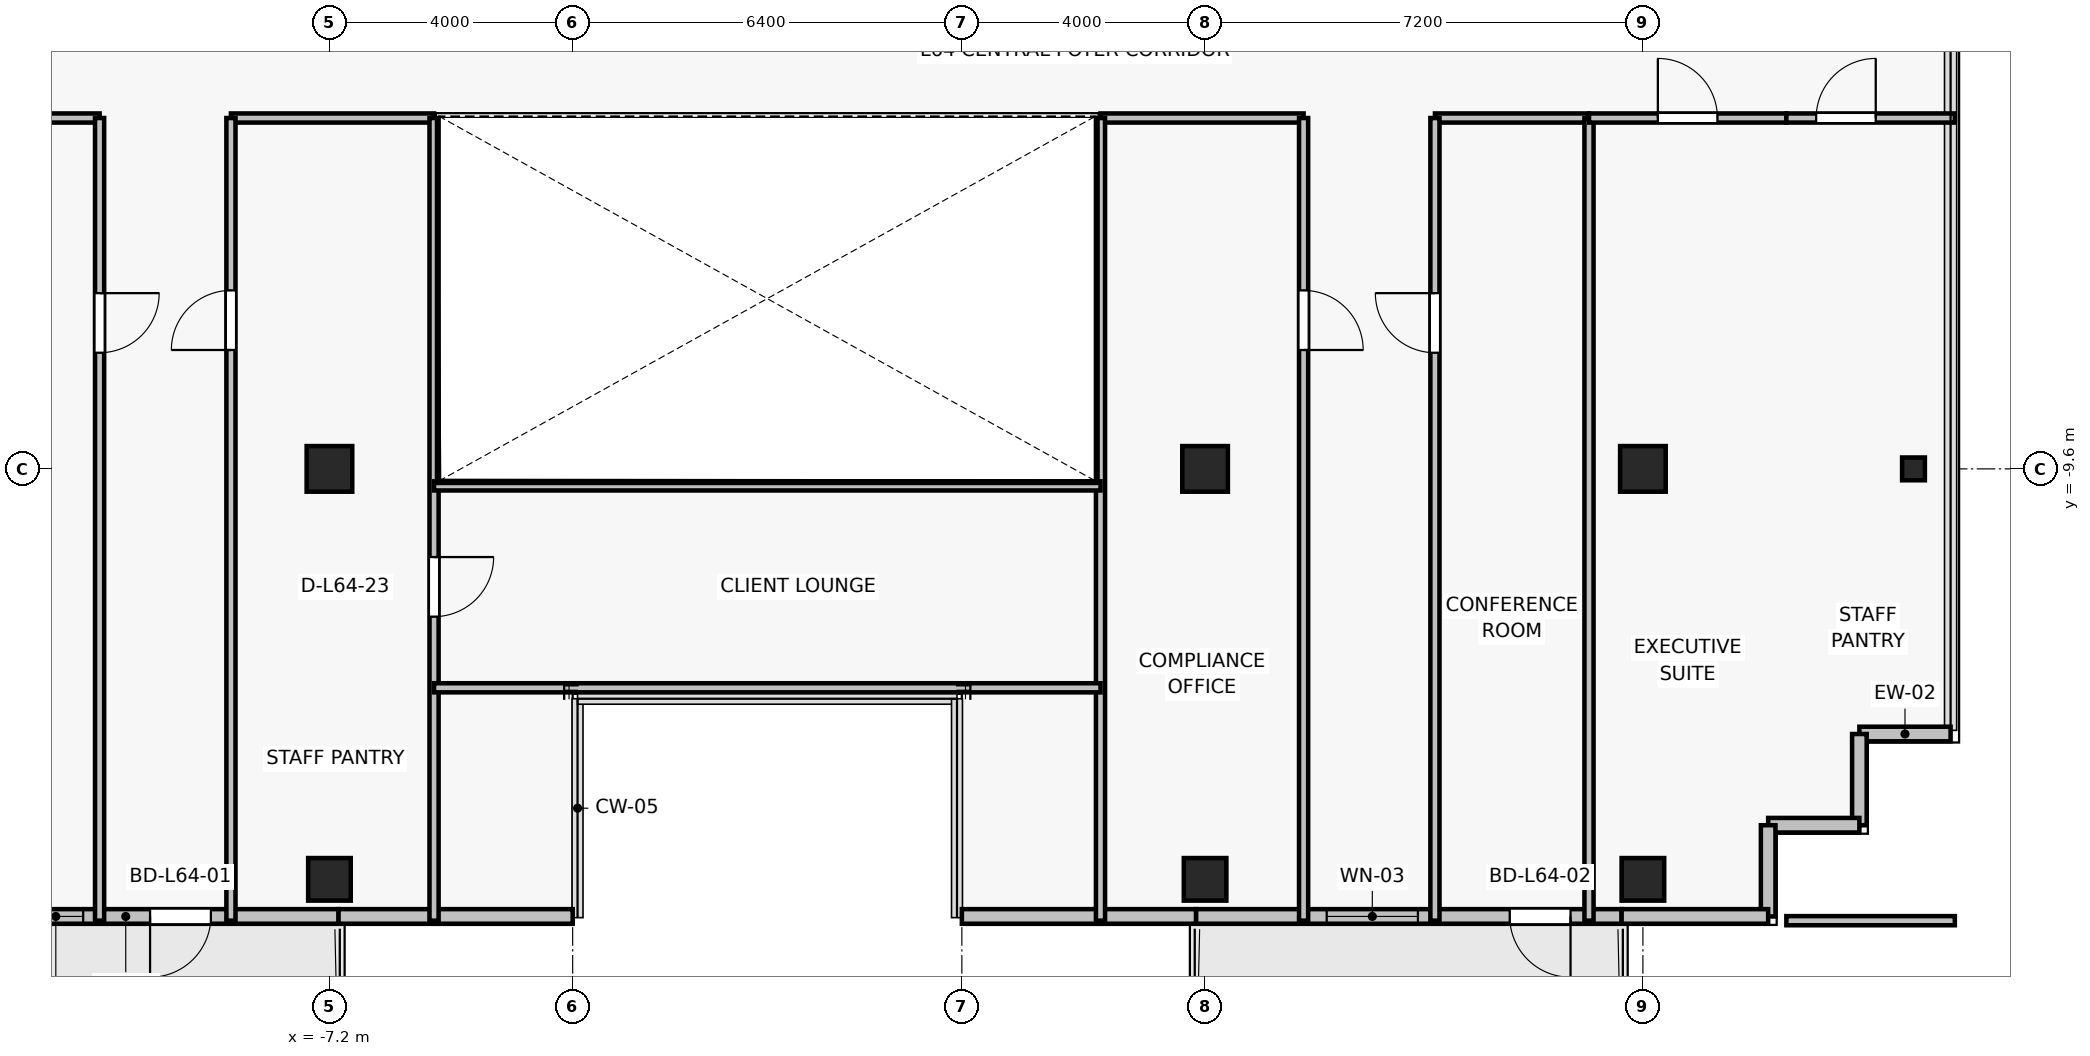
"""IFC4 building model, lengths in metres.
Left out: names, types, materials, properties, quantities, classifications, styles, units other than length and angle.
Written with IfcOpenShell. Run it as: python <this file> out.ifc"""

import sys

from ifc_helpers import new_model, si_unit, direction, frame, frame_2d, origin, origin_2d, place, context, subcontext, project, spatial, rectangle, i_section, extrude, source, transform, mapped, element, fill, save


model = new_model("IFC4")
c1 = context("Model", 3, precision=1e-05, world=origin(), true_north=direction((0.0, 1.0)))
c2 = subcontext(c1, "Body", "Model", "MODEL_VIEW")
j1 = project(units=[si_unit("LENGTHUNIT", "METRE"), si_unit("PLANEANGLEUNIT", "RADIAN")], contexts=[c1])
p1 = place(None, origin())
s1 = spatial("IfcSite", under=j1, at=p1, CompositionType="ELEMENT")
p2 = place(p1, origin())
s2 = spatial("IfcBuilding", under=s1, at=p2, CompositionType="ELEMENT")
p3 = place(p2, frame((0.0, 0.0, 228.7)))
s3 = spatial("IfcBuildingStorey", under=s2, at=p3, CompositionType="ELEMENT", Elevation=228.7)
for number, where, z_axis, x_axis in (
    (1, (-7.2, -9.6, 0.0), (0.0, 0.0, 1.0), (1.0, 0.0, 0.0)),
    (2, (7.2, -9.6, 0.0), (0.0, 0.0, 1.0), (1.0, 0.0, 0.0)),
    (3, (14.4, -9.6, 0.0), (0.0, 0.0, 1.0), (1.0, 0.0, 0.0)),
):
    element("IfcColumn", number, at=place(p3, frame(where, z_axis=z_axis, x_axis=x_axis)), inside=s3, PredefinedType="COLUMN", context=c2, shape_type="SweptSolid", body=[
        extrude(rectangle(XDim=0.75, YDim=0.75, at=origin_2d()), origin(), (0.0, 0.0, 1.0), 3.3),
    ])
for number, where, z_axis, x_axis in (
    (4, (-7.2, -16.35, 0.0), (0.0, 0.0, 1.0), (1.0, 0.0, 0.0)),
    (5, (7.2, -16.35, 0.0), (0.0, 0.0, 1.0), (1.0, 0.0, 0.0)),
    (6, (14.4, -16.35, 0.0), (0.0, 0.0, 1.0), (1.0, 0.0, 0.0)),
):
    element("IfcColumn", number, at=place(p3, frame(where, z_axis=z_axis, x_axis=x_axis)), inside=s3, PredefinedType="COLUMN", context=c2, shape_type="SweptSolid", body=[
        extrude(rectangle(XDim=0.7, YDim=0.7, at=origin_2d()), origin(), (0.0, 0.0, 1.0), 3.3),
    ])
p4 = place(p3, frame((18.85, -9.6, 0.0), z_axis=(0.0, 0.0, 1.0), x_axis=(1.0, 0.0, 0.0)))
e7 = element("IfcColumn", 7, at=p4, inside=s3, PredefinedType="COLUMN", context=c2, shape_type="SweptSolid", body=[
    extrude(i_section(OverallWidth=0.375, OverallDepth=0.375, WebThickness=0.017, FlangeThickness=0.027, FilletRadius=0.015, at=origin_2d()), origin(), (0.0, 0.0, 1.0), 3.3),
])
p5 = place(p3, frame((-7.05, -16.96, 0.0), z_axis=(0.0, 0.0, 1.0), x_axis=(-1.0, 0.0, 0.0)))
e8 = element("IfcWall", 8, at=p5, inside=s3, PredefinedType="SOLIDWALL", context=c2, shape_type="SweptSolid", body=[
    extrude(rectangle(XDim=7.0, YDim=0.24, at=frame_2d((3.5, 0.0))), origin(), (0.0, 0.0, 1.0), 2.665),
])
p6 = place(p5, frame((2.1, 0.0, 0.0)))
e9 = element("IfcOpeningElement", 9, at=p6, cuts=e8, PredefinedType="OPENING", context=c2, shape_type="SweptSolid", body=[
    extrude(rectangle(XDim=1.0, YDim=2.2, at=frame_2d((0.5, 1.1))), frame((0.0, 0.13, 0.0), z_axis=(0.0, -1.0, 0.0), x_axis=(1.0, 0.0, 0.0)), (0.0, 0.0, 1.0), 0.26),
])
p7 = place(p5, frame((4.2, 0.0, 0.85)))
e10 = element("IfcOpeningElement", 10, at=p7, cuts=e8, PredefinedType="OPENING", context=c2, shape_type="SweptSolid", body=[
    extrude(rectangle(XDim=0.9, YDim=1.35, at=frame_2d((0.45, 0.675))), frame((0.0, 0.13, 0.0), z_axis=(0.0, -1.0, 0.0), x_axis=(1.0, 0.0, 0.0)), (0.0, 0.0, 1.0), 0.26),
])
p8 = place(p3, frame((14.05, -16.96, 0.0), z_axis=(0.0, 0.0, 1.0), x_axis=(-1.0, 0.0, 0.0)))
e11 = element("IfcWall", 11, at=p8, inside=s3, PredefinedType="SOLIDWALL", context=c2, shape_type="SweptSolid", body=[
    extrude(rectangle(XDim=7.0, YDim=0.24, at=frame_2d((3.5, 0.0))), origin(), (0.0, 0.0, 1.0), 2.665),
])
p9 = place(p8, frame((0.84, 0.0, 0.0)))
e12 = element("IfcOpeningElement", 12, at=p9, cuts=e11, PredefinedType="OPENING", context=c2, shape_type="SweptSolid", body=[
    extrude(rectangle(XDim=1.0, YDim=2.2, at=frame_2d((0.5, 1.1))), frame((0.0, 0.13, 0.0), z_axis=(0.0, -1.0, 0.0), x_axis=(1.0, 0.0, 0.0)), (0.0, 0.0, 1.0), 0.26),
])
p10 = place(p8, frame((3.35, 0.0, 0.85)))
e13 = element("IfcOpeningElement", 13, at=p10, cuts=e11, PredefinedType="OPENING", context=c2, shape_type="SweptSolid", body=[
    extrude(rectangle(XDim=1.5, YDim=1.6, at=frame_2d((0.75, 0.8))), frame((0.0, 0.13, 0.0), z_axis=(0.0, -1.0, 0.0), x_axis=(1.0, 0.0, 0.0)), (0.0, 0.0, 1.0), 0.26),
])
for number, where, z_axis, x_axis in (
    (14, (17.96, -13.96, 0.0), (0.0, 0.0, 1.0), (1.0, 0.0, 0.0)),
    (15, (17.96, -15.46, 0.0), (0.0, 0.0, 1.0), (0.0, 1.0, 0.0)),
    (16, (16.46, -15.46, 0.0), (0.0, 0.0, 1.0), (1.0, 0.0, 0.0)),
    (17, (16.46, -16.96, 0.0), (0.0, 0.0, 1.0), (0.0, 1.0, 0.0)),
):
    element("IfcWall", number, at=place(p3, frame(where, z_axis=z_axis, x_axis=x_axis)), inside=s3, PredefinedType="SOLIDWALL", context=c2, shape_type="SweptSolid", body=[
        extrude(rectangle(XDim=1.5, YDim=0.24, at=frame_2d((0.75, 0.0))), origin(), (0.0, 0.0, 1.0), 3.075),
    ])
p11 = place(p3, frame((14.05, -16.96, 0.0), z_axis=(0.0, 0.0, 1.0), x_axis=(1.0, 0.0, 0.0)))
e18 = element("IfcWall", 18, at=p11, inside=s3, PredefinedType="SOLIDWALL", context=c2, shape_type="SweptSolid", body=[
    extrude(rectangle(XDim=2.41, YDim=0.24, at=frame_2d((1.205, 0.0))), origin(), (0.0, 0.0, 1.0), 3.075),
])
for number, where, z_axis, x_axis in (
    (19, (3.2, -16.96, 0.0), (0.0, 0.0, 1.0), (1.0, 0.0, 0.0)),
    (20, (-7.05, -16.96, 0.0), (0.0, 0.0, 1.0), (1.0, 0.0, 0.0)),
):
    element("IfcWall", number, at=place(p3, frame(where, z_axis=z_axis, x_axis=x_axis)), inside=s3, PredefinedType="SOLIDWALL", context=c2, shape_type="SweptSolid", body=[
        extrude(rectangle(XDim=3.85, YDim=0.24, at=frame_2d((1.925, 0.0))), origin(), (0.0, 0.0, 1.0), 3.075),
    ])
p12 = place(p3, frame((-23.53, -3.83, 0.0), z_axis=(0.0, 0.0, 1.0), x_axis=(1.0, 0.0, 0.0)))
e21 = element("IfcWall", 21, at=p12, inside=s3, PredefinedType="PARTITIONING", context=c2, shape_type="SweptSolid", body=[
    extrude(rectangle(XDim=12.55, YDim=0.15, at=frame_2d((6.275, 0.0))), origin(), (0.0, 0.0, 1.0), 2.615),
])
p13 = place(p3, frame((-10.98, -3.83, 0.0), z_axis=(0.0, 0.0, 1.0), x_axis=(0.0, -1.0, 0.0)))
e22 = element("IfcWall", 22, at=p13, inside=s3, PredefinedType="PARTITIONING", context=c2, shape_type="SweptSolid", body=[
    extrude(rectangle(XDim=13.2, YDim=0.15, at=frame_2d((6.6, 0.0))), origin(), (0.0, 0.0, 1.0), 2.615),
])
p14 = place(p13, frame((2.88, 0.0, 0.0)))
e23 = element("IfcOpeningElement", 23, at=p14, cuts=e22, PredefinedType="OPENING", context=c2, shape_type="SweptSolid", body=[
    extrude(rectangle(XDim=0.98, YDim=2.15, at=frame_2d((0.49, 1.075))), frame((0.0, 0.085, 0.0), z_axis=(0.0, -1.0, 0.0), x_axis=(1.0, 0.0, 0.0)), (0.0, 0.0, 1.0), 0.17),
])
p15 = place(p3, frame((10.98, -3.83, 0.0), z_axis=(0.0, 0.0, 1.0), x_axis=(1.0, 0.0, 0.0)))
e24 = element("IfcWall", 24, at=p15, inside=s3, PredefinedType="PARTITIONING", context=c2, shape_type="SweptSolid", body=[
    extrude(rectangle(XDim=2.533, YDim=0.15, at=frame_2d((1.267, 0.0))), origin(), (0.0, 0.0, 1.0), 3.075),
])
p16 = place(p3, frame((10.98, -17.03, 0.0), z_axis=(0.0, 0.0, 1.0), x_axis=(0.0, 1.0, 0.0)))
e25 = element("IfcWall", 25, at=p16, inside=s3, PredefinedType="PARTITIONING", context=c2, shape_type="SweptSolid", body=[
    extrude(rectangle(XDim=13.2, YDim=0.15, at=frame_2d((6.6, 0.0))), origin(), (0.0, 0.0, 1.0), 2.615),
])
p17 = place(p16, frame((9.34, 0.0, 0.0)))
e26 = element("IfcOpeningElement", 26, at=p17, cuts=e25, PredefinedType="OPENING", context=c2, shape_type="SweptSolid", body=[
    extrude(rectangle(XDim=0.98, YDim=2.15, at=frame_2d((0.49, 1.075))), frame((0.0, 0.085, 0.0), z_axis=(0.0, -1.0, 0.0), x_axis=(1.0, 0.0, 0.0)), (0.0, 0.0, 1.0), 0.17),
])
p18 = place(p3, frame((13.513, -3.83, 0.0), z_axis=(0.0, 0.0, 1.0), x_axis=(0.0, -1.0, 0.0)))
e27 = element("IfcWall", 27, at=p18, inside=s3, PredefinedType="PARTITIONING", context=c2, shape_type="SweptSolid", body=[
    extrude(rectangle(XDim=13.2, YDim=0.15, at=frame_2d((6.6, 0.0))), origin(), (0.0, 0.0, 1.0), 2.615),
])
p19 = place(p3, frame((13.513, -3.83, 0.0), z_axis=(0.0, 0.0, 1.0), x_axis=(1.0, 0.0, 0.0)))
e28 = element("IfcWall", 28, at=p19, inside=s3, PredefinedType="PARTITIONING", context=c2, shape_type="SweptSolid", body=[
    extrude(rectangle(XDim=3.246, YDim=0.15, at=frame_2d((1.623, 0.0))), origin(), (0.0, 0.0, 1.0), 2.615),
])
p20 = place(p19, frame((1.133, 0.0, 0.0)))
e29 = element("IfcOpeningElement", 29, at=p20, cuts=e28, PredefinedType="OPENING", context=c2, shape_type="SweptSolid", body=[
    extrude(rectangle(XDim=0.98, YDim=2.15, at=frame_2d((0.49, 1.075))), frame((0.0, 0.085, 0.0), z_axis=(0.0, -1.0, 0.0), x_axis=(1.0, 0.0, 0.0)), (0.0, 0.0, 1.0), 0.17),
])
p21 = place(p3, frame((19.53, -17.03, 0.0), z_axis=(0.0, 0.0, 1.0), x_axis=(-1.0, 0.0, 0.0)))
e30 = element("IfcWall", 30, at=p21, inside=s3, PredefinedType="PARTITIONING", context=c2, shape_type="SweptSolid", body=[
    extrude(rectangle(XDim=2.771, YDim=0.15, at=frame_2d((1.385, 0.0))), origin(), (0.0, 0.0, 1.0), 3.075),
])
p22 = place(p3, frame((16.759, -3.83, 0.0), z_axis=(0.0, 0.0, 1.0), x_axis=(1.0, 0.0, 0.0)))
e31 = element("IfcWall", 31, at=p22, inside=s3, PredefinedType="PARTITIONING", context=c2, shape_type="SweptSolid", body=[
    extrude(rectangle(XDim=2.771, YDim=0.15, at=frame_2d((1.385, 0.0))), origin(), (0.0, 0.0, 1.0), 3.075),
])
p23 = place(p22, frame((0.49, 0.0, 0.0)))
e32 = element("IfcOpeningElement", 32, at=p23, cuts=e31, PredefinedType="OPENING", context=c2, shape_type="SweptSolid", body=[
    extrude(rectangle(XDim=0.98, YDim=2.15, at=frame_2d((0.49, 1.075))), frame((0.0, 0.085, 0.0), z_axis=(0.0, -1.0, 0.0), x_axis=(1.0, 0.0, 0.0)), (0.0, 0.0, 1.0), 0.17),
])
p24 = place(p3, frame((-8.82, -3.83, 0.0), z_axis=(0.0, 0.0, 1.0), x_axis=(1.0, 0.0, 0.0)))
e33 = element("IfcWall", 33, at=p24, inside=s3, PredefinedType="PARTITIONING", context=c2, shape_type="SweptSolid", body=[
    extrude(rectangle(XDim=3.34, YDim=0.15, at=frame_2d((1.67, 0.0))), origin(), (0.0, 0.0, 1.0), 2.615),
])
p25 = place(p3, frame((-8.82, -17.03, 0.0), z_axis=(0.0, 0.0, 1.0), x_axis=(0.0, 1.0, 0.0)))
e34 = element("IfcWall", 34, at=p25, inside=s3, PredefinedType="PARTITIONING", context=c2, shape_type="SweptSolid", body=[
    extrude(rectangle(XDim=13.2, YDim=0.15, at=frame_2d((6.6, 0.0))), origin(), (0.0, 0.0, 1.0), 2.615),
])
p26 = place(p25, frame((9.385, 0.0, 0.0)))
e35 = element("IfcOpeningElement", 35, at=p26, cuts=e34, PredefinedType="OPENING", context=c2, shape_type="SweptSolid", body=[
    extrude(rectangle(XDim=0.98, YDim=2.15, at=frame_2d((0.49, 1.075))), frame((0.0, 0.085, 0.0), z_axis=(0.0, -1.0, 0.0), x_axis=(1.0, 0.0, 0.0)), (0.0, 0.0, 1.0), 0.17),
])
p27 = place(p3, frame((-5.48, -3.83, 0.0), z_axis=(0.0, 0.0, 1.0), x_axis=(0.0, -1.0, 0.0)))
e36 = element("IfcWall", 36, at=p27, inside=s3, PredefinedType="PARTITIONING", context=c2, shape_type="SweptSolid", body=[
    extrude(rectangle(XDim=13.2, YDim=0.15, at=frame_2d((6.6, 0.0))), origin(), (0.0, 0.0, 1.0), 2.615),
])
p28 = place(p27, frame((7.22, 0.0, 0.0)))
e37 = element("IfcOpeningElement", 37, at=p28, cuts=e36, PredefinedType="OPENING", context=c2, shape_type="SweptSolid", body=[
    extrude(rectangle(XDim=0.98, YDim=2.15, at=frame_2d((0.49, 1.075))), frame((0.0, 0.085, 0.0), z_axis=(0.0, -1.0, 0.0), x_axis=(1.0, 0.0, 0.0)), (0.0, 0.0, 1.0), 0.17),
])
p29 = place(p3, frame((5.48, -3.83, 0.0), z_axis=(0.0, 0.0, 1.0), x_axis=(1.0, 0.0, 0.0)))
e38 = element("IfcWall", 38, at=p29, inside=s3, PredefinedType="PARTITIONING", context=c2, shape_type="SweptSolid", body=[
    extrude(rectangle(XDim=3.34, YDim=0.15, at=frame_2d((1.67, 0.0))), origin(), (0.0, 0.0, 1.0), 2.615),
])
p30 = place(p3, frame((5.48, -17.03, 0.0), z_axis=(0.0, 0.0, 1.0), x_axis=(0.0, 1.0, 0.0)))
e39 = element("IfcWall", 39, at=p30, inside=s3, PredefinedType="PARTITIONING", context=c2, shape_type="SweptSolid", body=[
    extrude(rectangle(XDim=13.2, YDim=0.15, at=frame_2d((6.6, 0.0))), origin(), (0.0, 0.0, 1.0), 2.615),
])
p31 = place(p3, frame((8.82, -3.83, 0.0), z_axis=(0.0, 0.0, 1.0), x_axis=(0.0, -1.0, 0.0)))
e40 = element("IfcWall", 40, at=p31, inside=s3, PredefinedType="PARTITIONING", context=c2, shape_type="SweptSolid", body=[
    extrude(rectangle(XDim=13.2, YDim=0.15, at=frame_2d((6.6, 0.0))), origin(), (0.0, 0.0, 1.0), 2.615),
])
p32 = place(p31, frame((2.835, 0.0, 0.0)))
e41 = element("IfcOpeningElement", 41, at=p32, cuts=e40, PredefinedType="OPENING", context=c2, shape_type="SweptSolid", body=[
    extrude(rectangle(XDim=0.98, YDim=2.15, at=frame_2d((0.49, 1.075))), frame((0.0, 0.085, 0.0), z_axis=(0.0, -1.0, 0.0), x_axis=(1.0, 0.0, 0.0)), (0.0, 0.0, 1.0), 0.17),
])
p33 = place(p3, frame((5.48, -13.2, 0.0), z_axis=(0.0, 0.0, 1.0), x_axis=(-1.0, 0.0, 0.0)))
e42 = element("IfcWall", 42, at=p33, inside=s3, PredefinedType="PARTITIONING", context=c2, shape_type="SweptSolid", body=[
    extrude(rectangle(XDim=10.96, YDim=0.15, at=frame_2d((5.48, 0.0))), origin(), (0.0, 0.0, 1.0), 2.765),
])
p34 = place(p3, frame((-5.48, -9.88, 0.0), z_axis=(0.0, 0.0, 1.0), x_axis=(1.0, 0.0, 0.0)))
e43 = element("IfcWall", 43, at=p34, inside=s3, PredefinedType="PARTITIONING", context=c2, shape_type="SweptSolid", body=[
    extrude(rectangle(XDim=10.96, YDim=0.15, at=frame_2d((5.48, 0.0))), origin(), (0.0, 0.0, 1.0), 2.615),
])
m1 = source(origin(), c2, "Body", "SweptSolid", [
    extrude(rectangle(XDim=1.0, YDim=2.2, at=frame_2d((0.5, 1.1))), frame((0.0, 0.025, 0.0), z_axis=(0.0, -1.0, 0.0), x_axis=(1.0, 0.0, 0.0)), (0.0, 0.0, 1.0), 0.05),
])
p35 = place(p6, origin())
e44 = element("IfcDoor", 44, at=p35, inside=s3, OperationType="SINGLE_SWING_RIGHT", PredefinedType="DOOR", context=c2, shape_type="MappedRepresentation", body=[
    mapped(m1, transform((0.0, 0.0, 0.0), x_axis=(1.0, 0.0, 0.0), y_axis=(0.0, 1.0, 0.0), z_axis=(0.0, 0.0, 1.0), scale=1.0)),
])
fill(e9, e44)
m2 = source(origin(), c2, "Body", "SweptSolid", [
    extrude(rectangle(XDim=0.9, YDim=1.35, at=frame_2d((0.45, 0.675))), frame((0.0, 0.03, 0.0), z_axis=(0.0, -1.0, 0.0), x_axis=(1.0, 0.0, 0.0)), (0.0, 0.0, 1.0), 0.06),
])
p36 = place(p7, origin())
e45 = element("IfcWindow", 45, at=p36, inside=s3, PartitioningType="SINGLE_PANEL", PredefinedType="WINDOW", context=c2, shape_type="MappedRepresentation", body=[
    mapped(m2, transform((0.0, 0.0, 0.0), x_axis=(1.0, 0.0, 0.0), y_axis=(0.0, 1.0, 0.0), z_axis=(0.0, 0.0, 1.0), scale=1.0)),
])
fill(e10, e45)
p37 = place(p9, origin())
e46 = element("IfcDoor", 46, at=p37, inside=s3, OperationType="SINGLE_SWING_LEFT", PredefinedType="DOOR", context=c2, shape_type="MappedRepresentation", body=[
    mapped(m1, transform((0.0, 0.0, 0.0), x_axis=(1.0, 0.0, 0.0), y_axis=(0.0, 1.0, 0.0), z_axis=(0.0, 0.0, 1.0), scale=1.0)),
])
fill(e12, e46)
m3 = source(origin(), c2, "Body", "SweptSolid", [
    extrude(rectangle(XDim=1.5, YDim=1.6, at=frame_2d((0.75, 0.8))), frame((0.0, 0.03, 0.0), z_axis=(0.0, -1.0, 0.0), x_axis=(1.0, 0.0, 0.0)), (0.0, 0.0, 1.0), 0.06),
])
p38 = place(p10, origin())
e47 = element("IfcWindow", 47, at=p38, inside=s3, PartitioningType="SINGLE_PANEL", PredefinedType="WINDOW", context=c2, shape_type="MappedRepresentation", body=[
    mapped(m3, transform((0.0, 0.0, 0.0), x_axis=(1.0, 0.0, 0.0), y_axis=(0.0, 1.0, 0.0), z_axis=(0.0, 0.0, 1.0), scale=1.0)),
])
fill(e13, e47)
m4 = source(origin(), c2, "Body", "SweptSolid", [
    extrude(rectangle(XDim=0.98, YDim=2.15, at=frame_2d((0.49, 1.075))), frame((0.0, 0.025, 0.0), z_axis=(0.0, -1.0, 0.0), x_axis=(1.0, 0.0, 0.0)), (0.0, 0.0, 1.0), 0.05),
])
p39 = place(p14, origin())
e48 = element("IfcDoor", 48, at=p39, inside=s3, OperationType="SINGLE_SWING_LEFT", PredefinedType="DOOR", context=c2, shape_type="MappedRepresentation", body=[
    mapped(m4, transform((0.0, 0.0, 0.0), x_axis=(1.0, 0.0, 0.0), y_axis=(0.0, 1.0, 0.0), z_axis=(0.0, 0.0, 1.0), scale=1.0)),
])
fill(e23, e48)
p40 = place(p17, origin())
e49 = element("IfcDoor", 49, at=p40, inside=s3, OperationType="SINGLE_SWING_RIGHT", PredefinedType="DOOR", context=c2, shape_type="MappedRepresentation", body=[
    mapped(m4, transform((0.0, 0.0, 0.0), x_axis=(1.0, 0.0, 0.0), y_axis=(0.0, 1.0, 0.0), z_axis=(0.0, 0.0, 1.0), scale=1.0)),
])
fill(e26, e49)
p41 = place(p20, origin())
e50 = element("IfcDoor", 50, at=p41, inside=s3, OperationType="SINGLE_SWING_LEFT", PredefinedType="DOOR", context=c2, shape_type="MappedRepresentation", body=[
    mapped(m4, transform((0.0, 0.0, 0.0), x_axis=(1.0, 0.0, 0.0), y_axis=(0.0, 1.0, 0.0), z_axis=(0.0, 0.0, 1.0), scale=1.0)),
])
fill(e29, e50)
p42 = place(p23, origin())
e51 = element("IfcDoor", 51, at=p42, inside=s3, OperationType="SINGLE_SWING_RIGHT", PredefinedType="DOOR", context=c2, shape_type="MappedRepresentation", body=[
    mapped(m4, transform((0.0, 0.0, 0.0), x_axis=(1.0, 0.0, 0.0), y_axis=(0.0, 1.0, 0.0), z_axis=(0.0, 0.0, 1.0), scale=1.0)),
])
fill(e32, e51)
p43 = place(p26, origin())
e52 = element("IfcDoor", 52, at=p43, inside=s3, OperationType="SINGLE_SWING_LEFT", PredefinedType="DOOR", context=c2, shape_type="MappedRepresentation", body=[
    mapped(m4, transform((0.0, 0.0, 0.0), x_axis=(1.0, 0.0, 0.0), y_axis=(0.0, 1.0, 0.0), z_axis=(0.0, 0.0, 1.0), scale=1.0)),
])
fill(e35, e52)
p44 = place(p32, origin())
e53 = element("IfcDoor", 53, at=p44, inside=s3, OperationType="SINGLE_SWING_RIGHT", PredefinedType="DOOR", context=c2, shape_type="MappedRepresentation", body=[
    mapped(m4, transform((0.0, 0.0, 0.0), x_axis=(1.0, 0.0, 0.0), y_axis=(0.0, 1.0, 0.0), z_axis=(0.0, 0.0, 1.0), scale=1.0)),
])
fill(e41, e53)
p45 = place(p28, origin())
e54 = element("IfcDoor", 54, at=p45, inside=s3, OperationType="SINGLE_SWING_LEFT", PredefinedType="DOOR", context=c2, shape_type="MappedRepresentation", body=[
    mapped(m4, transform((0.0, 0.0, 0.0), x_axis=(1.0, 0.0, 0.0), y_axis=(0.0, 1.0, 0.0), z_axis=(0.0, 0.0, 1.0), scale=1.0)),
])
fill(e37, e54)
save(model, sys.argv[1])
